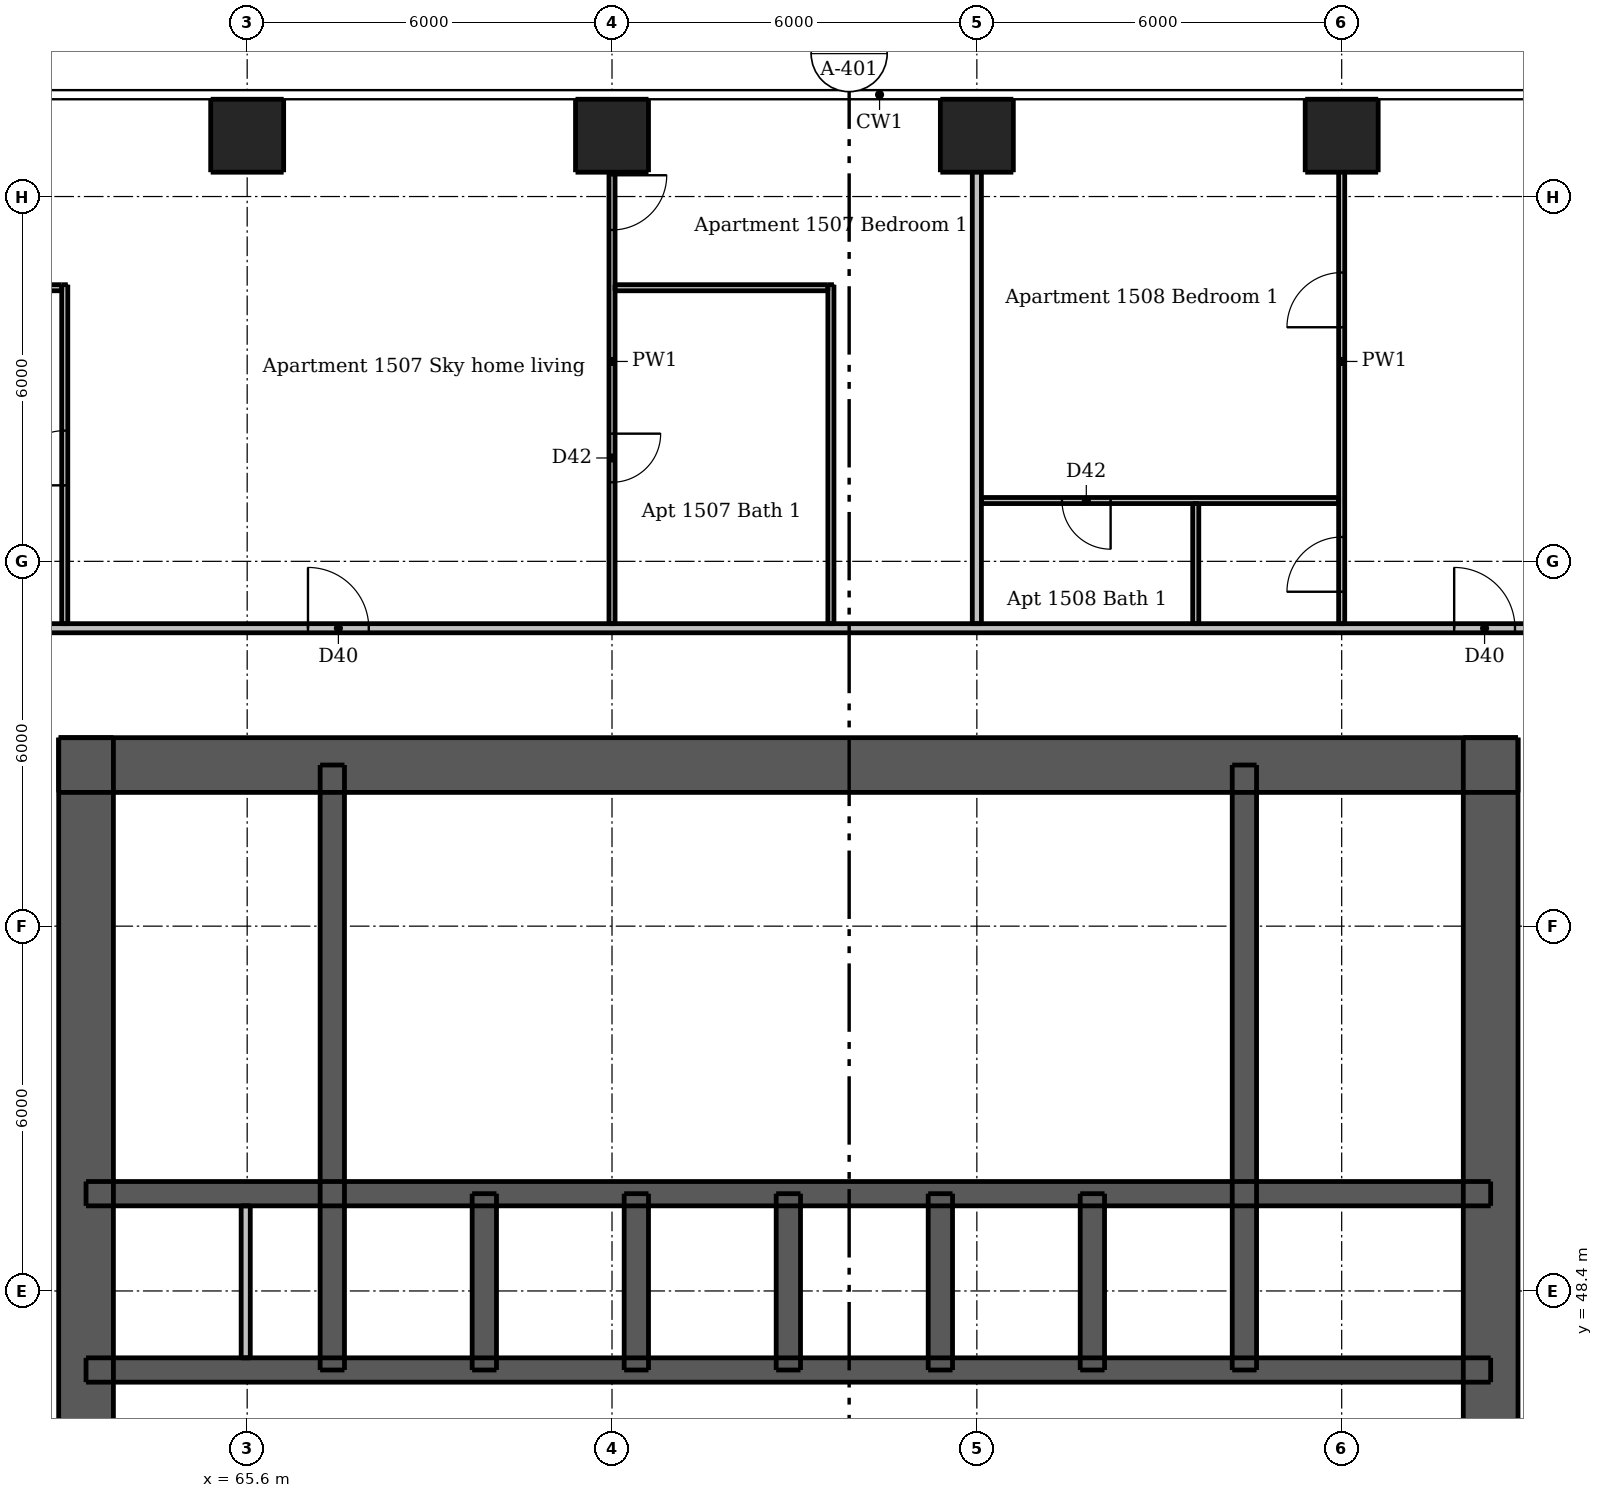
"""IFC4 building model, lengths in metres.
Left out: names, types, materials, properties, quantities, classifications, styles, units other than length and angle.
Written with IfcOpenShell. Run it as: python <this file> out.ifc"""

import sys

from ifc_helpers import new_model, si_unit, direction, frame, frame_2d, origin, origin_2d, place, context, subcontext, project, spatial, rectangle, extrude, element, fill, save


model = new_model("IFC4")
c1 = context("Model", 3, precision=1e-05, world=origin(), true_north=direction((0.0, 1.0)))
c2 = subcontext(c1, "Body", "Model", "MODEL_VIEW")
j1 = project(units=[si_unit("LENGTHUNIT", "METRE"), si_unit("PLANEANGLEUNIT", "RADIAN")], contexts=[c1])
p1 = place(None, origin())
s1 = spatial("IfcSite", under=j1, at=p1, CompositionType="ELEMENT")
p2 = place(p1, origin())
s2 = spatial("IfcBuilding", under=s1, at=p2, CompositionType="ELEMENT")
p3 = place(p2, frame((0.0, 0.0, 56.5)))
s3 = spatial("IfcBuildingStorey", under=s2, at=p3, CompositionType="ELEMENT", Elevation=56.5)
p4 = place(p3, frame((62.5, 57.05, 0.0), z_axis=(0.0, 0.0, 1.0), x_axis=(1.0, 0.0, 0.0)))
e1 = element("IfcWall", 1, at=p4, inside=s3, PredefinedType="SHEAR", context=c2, shape_type="SweptSolid", body=[
    extrude(rectangle(XDim=24.0, YDim=0.9, at=frame_2d((12.0, 0.0))), origin(), (0.0, 0.0, 1.0), 3.05),
])
p5 = place(p4, frame((20.85, 0.0, 0.0)))
e2 = element("IfcOpeningElement", 2, at=p5, cuts=e1, PredefinedType="OPENING", context=c2, shape_type="SweptSolid", body=[
    extrude(rectangle(XDim=1.1, YDim=2.1, at=frame_2d((0.55, 1.05))), frame((0.0, 0.46, 0.0), z_axis=(0.0, -1.0, 0.0), x_axis=(1.0, 0.0, 0.0)), (0.0, 0.0, 1.0), 0.92),
])
p6 = place(p4, frame((2.05, 0.0, 0.0)))
e3 = element("IfcOpeningElement", 3, at=p6, cuts=e1, PredefinedType="OPENING", context=c2, shape_type="SweptSolid", body=[
    extrude(rectangle(XDim=1.1, YDim=2.1, at=frame_2d((0.55, 1.05))), frame((0.0, 0.46, 0.0), z_axis=(0.0, -1.0, 0.0), x_axis=(1.0, 0.0, 0.0)), (0.0, 0.0, 1.0), 0.92),
])
p7 = place(p4, frame((11.55, 0.0, 0.0)))
e4 = element("IfcOpeningElement", 4, at=p7, cuts=e1, PredefinedType="OPENING", context=c2, shape_type="SweptSolid", body=[
    extrude(rectangle(XDim=0.9, YDim=2.1, at=frame_2d((0.45, 1.05))), frame((0.0, 0.46, 0.0), z_axis=(0.0, -1.0, 0.0), x_axis=(1.0, 0.0, 0.0)), (0.0, 0.0, 1.0), 0.92),
])
p8 = place(p3, frame((62.95, 33.5, 0.0), z_axis=(0.0, 0.0, 1.0), x_axis=(0.0, 1.0, 0.0)))
e5 = element("IfcWall", 5, at=p8, inside=s3, PredefinedType="SHEAR", context=c2, shape_type="SweptSolid", body=[
    extrude(rectangle(XDim=24.0, YDim=0.9, at=frame_2d((12.0, 0.0))), origin(), (0.0, 0.0, 1.0), 3.05),
])
p9 = place(p8, frame((11.2, 0.0, 0.0)))
e6 = element("IfcOpeningElement", 6, at=p9, cuts=e5, PredefinedType="OPENING", context=c2, shape_type="SweptSolid", body=[
    extrude(rectangle(XDim=1.6, YDim=2.1, at=frame_2d((0.8, 1.05))), frame((0.0, 0.46, 0.0), z_axis=(0.0, -1.0, 0.0), x_axis=(1.0, 0.0, 0.0)), (0.0, 0.0, 1.0), 0.92),
])
p10 = place(p3, frame((86.05, 33.5, 0.0), z_axis=(0.0, 0.0, 1.0), x_axis=(0.0, 1.0, 0.0)))
e7 = element("IfcWall", 7, at=p10, inside=s3, PredefinedType="SHEAR", context=c2, shape_type="SweptSolid", body=[
    extrude(rectangle(XDim=24.0, YDim=0.9, at=frame_2d((12.0, 0.0))), origin(), (0.0, 0.0, 1.0), 3.05),
])
p11 = place(p10, frame((11.2, 0.0, 0.0)))
e8 = element("IfcOpeningElement", 8, at=p11, cuts=e7, PredefinedType="OPENING", context=c2, shape_type="SweptSolid", body=[
    extrude(rectangle(XDim=1.6, YDim=2.1, at=frame_2d((0.8, 1.05))), frame((0.0, 0.46, 0.0), z_axis=(0.0, -1.0, 0.0), x_axis=(1.0, 0.0, 0.0)), (0.0, 0.0, 1.0), 0.92),
])
p12 = place(p3, frame((62.95, 47.1, 0.0), z_axis=(0.0, 0.0, 1.0), x_axis=(1.0, 0.0, 0.0)))
e9 = element("IfcWall", 9, at=p12, inside=s3, PredefinedType="SHEAR", context=c2, shape_type="SweptSolid", body=[
    extrude(rectangle(XDim=23.1, YDim=0.4, at=frame_2d((11.55, 0.0))), origin(), (0.0, 0.0, 1.0), 3.05),
])
p13 = place(p12, frame((1.088, 0.0, 0.0)))
e10 = element("IfcOpeningElement", 10, at=p13, cuts=e9, PredefinedType="OPENING", context=c2, shape_type="SweptSolid", body=[
    extrude(rectangle(XDim=0.9, YDim=2.1, at=frame_2d((0.45, 1.05))), frame((0.0, 0.21, 0.0), z_axis=(0.0, -1.0, 0.0), x_axis=(1.0, 0.0, 0.0)), (0.0, 0.0, 1.0), 0.42),
])
p14 = place(p12, frame((2.838, 0.0, 0.0)))
e11 = element("IfcOpeningElement", 11, at=p14, cuts=e9, PredefinedType="OPENING", context=c2, shape_type="SweptSolid", body=[
    extrude(rectangle(XDim=0.8, YDim=2.1, at=frame_2d((0.4, 1.05))), frame((0.0, 0.21, 0.0), z_axis=(0.0, -1.0, 0.0), x_axis=(1.0, 0.0, 0.0)), (0.0, 0.0, 1.0), 0.42),
])
p15 = place(p12, frame((20.5, 0.0, 0.0)))
e12 = element("IfcOpeningElement", 12, at=p15, cuts=e9, PredefinedType="OPENING", context=c2, shape_type="SweptSolid", body=[
    extrude(rectangle(XDim=0.9, YDim=2.1, at=frame_2d((0.45, 1.05))), frame((0.0, 0.21, 0.0), z_axis=(0.0, -1.0, 0.0), x_axis=(1.0, 0.0, 0.0)), (0.0, 0.0, 1.0), 0.42),
])
p16 = place(p3, frame((62.95, 50.0, 0.0), z_axis=(0.0, 0.0, 1.0), x_axis=(1.0, 0.0, 0.0)))
e13 = element("IfcWall", 13, at=p16, inside=s3, PredefinedType="SHEAR", context=c2, shape_type="SweptSolid", body=[
    extrude(rectangle(XDim=23.1, YDim=0.4, at=frame_2d((11.55, 0.0))), origin(), (0.0, 0.0, 1.0), 3.05),
])
for number, where, z_axis, x_axis in (
    (14, (67.0, 47.1, 0.0), (0.0, 0.0, 1.0), (0.0, 1.0, 0.0)),
    (15, (82.0, 47.1, 0.0), (0.0, 0.0, 1.0), (0.0, 1.0, 0.0)),
):
    element("IfcWall", number, at=place(p3, frame(where, z_axis=z_axis, x_axis=x_axis)), inside=s3, PredefinedType="SHEAR", context=c2, shape_type="SweptSolid", body=[
        extrude(rectangle(XDim=9.95, YDim=0.4, at=frame_2d((4.975, 0.0))), origin(), (0.0, 0.0, 1.0), 3.05),
    ])
for number, where, z_axis, x_axis in (
    (16, (69.5, 47.1, 0.0), (0.0, 0.0, 1.0), (0.0, 1.0, 0.0)),
    (17, (72.0, 47.1, 0.0), (0.0, 0.0, 1.0), (0.0, 1.0, 0.0)),
    (18, (74.5, 47.1, 0.0), (0.0, 0.0, 1.0), (0.0, 1.0, 0.0)),
    (19, (77.0, 47.1, 0.0), (0.0, 0.0, 1.0), (0.0, 1.0, 0.0)),
    (20, (79.5, 47.1, 0.0), (0.0, 0.0, 1.0), (0.0, 1.0, 0.0)),
):
    element("IfcWall", number, at=place(p3, frame(where, z_axis=z_axis, x_axis=x_axis)), inside=s3, PredefinedType="SHEAR", context=c2, shape_type="SweptSolid", body=[
        extrude(rectangle(XDim=2.9, YDim=0.4, at=frame_2d((1.45, 0.0))), origin(), (0.0, 0.0, 1.0), 3.05),
    ])
for number, where, z_axis, x_axis in (
    (21, (65.6, 67.4, 0.0), (0.0, 0.0, 1.0), (1.0, 0.0, 0.0)),
    (22, (71.6, 67.4, 0.0), (0.0, 0.0, 1.0), (1.0, 0.0, 0.0)),
    (23, (77.6, 67.4, 0.0), (0.0, 0.0, 1.0), (1.0, 0.0, 0.0)),
    (24, (83.6, 67.4, 0.0), (0.0, 0.0, 1.0), (1.0, 0.0, 0.0)),
):
    element("IfcColumn", number, at=place(p3, frame(where, z_axis=z_axis, x_axis=x_axis)), inside=s3, PredefinedType="COLUMN", context=c2, shape_type="SweptSolid", body=[
        extrude(rectangle(XDim=1.2, YDim=1.2, at=origin_2d()), origin(), (0.0, 0.0, 1.0), 3.05),
    ])
p17 = place(p3, frame((65.576, 47.3, 0.0), z_axis=(0.0, 0.0, 1.0), x_axis=(0.0, 1.0, 0.0)))
e25 = element("IfcWall", 25, at=p17, inside=s3, PredefinedType="PLUMBINGWALL", context=c2, shape_type="SweptSolid", body=[
    extrude(rectangle(XDim=2.5, YDim=0.15, at=frame_2d((1.25, 0.0))), origin(), (0.0, 0.0, 1.0), 3.05),
])
p18 = place(p3, frame((62.6, 59.375, 0.0), z_axis=(0.0, 0.0, 1.0), x_axis=(0.0, 1.0, 0.0)))
e26 = element("IfcWall", 26, at=p18, inside=s3, PredefinedType="PARTITIONING", context=c2, shape_type="SweptSolid", body=[
    extrude(rectangle(XDim=5.575, YDim=0.1, at=frame_2d((2.788, 0.0))), origin(), (0.0, 0.0, 1.0), 3.05),
])
p19 = place(p18, frame((2.275, 0.0, 0.0)))
e27 = element("IfcOpeningElement", 27, at=p19, cuts=e26, PredefinedType="OPENING", context=c2, shape_type="SweptSolid", body=[
    extrude(rectangle(XDim=0.9, YDim=2.1, at=frame_2d((0.45, 1.05))), frame((0.0, 0.06, 0.0), z_axis=(0.0, -1.0, 0.0), x_axis=(1.0, 0.0, 0.0)), (0.0, 0.0, 1.0), 0.12),
])
p20 = place(p3, frame((71.6, 68.0, 0.0), z_axis=(0.0, 0.0, 1.0), x_axis=(0.0, -1.0, 0.0)))
e28 = element("IfcWall", 28, at=p20, inside=s3, PredefinedType="PARTITIONING", context=c2, shape_type="SweptSolid", body=[
    extrude(rectangle(XDim=8.625, YDim=0.1, at=frame_2d((4.312, 0.0))), origin(), (0.0, 0.0, 1.0), 2.516),
])
p21 = place(p20, frame((1.25, 0.0, 0.0)))
e29 = element("IfcOpeningElement", 29, at=p21, cuts=e28, PredefinedType="OPENING", context=c2, shape_type="SweptSolid", body=[
    extrude(rectangle(XDim=0.9, YDim=2.1, at=frame_2d((0.45, 1.05))), frame((0.0, 0.06, 0.0), z_axis=(0.0, -1.0, 0.0), x_axis=(1.0, 0.0, 0.0)), (0.0, 0.0, 1.0), 0.12),
])
p22 = place(p20, frame((5.5, 0.0, 0.0)))
e30 = element("IfcOpeningElement", 30, at=p22, cuts=e28, PredefinedType="OPENING", context=c2, shape_type="SweptSolid", body=[
    extrude(rectangle(XDim=0.8, YDim=2.1, at=frame_2d((0.4, 1.05))), frame((0.0, 0.06, 0.0), z_axis=(0.0, -1.0, 0.0), x_axis=(1.0, 0.0, 0.0)), (0.0, 0.0, 1.0), 0.12),
])
p23 = place(p3, frame((75.2, 59.375, 0.0), z_axis=(0.0, 0.0, 1.0), x_axis=(0.0, 1.0, 0.0)))
e31 = element("IfcWall", 31, at=p23, inside=s3, PredefinedType="PARTITIONING", context=c2, shape_type="SweptSolid", body=[
    extrude(rectangle(XDim=5.575, YDim=0.1, at=frame_2d((2.788, 0.0))), origin(), (0.0, 0.0, 1.0), 3.05),
])
p24 = place(p3, frame((81.2, 59.375, 0.0), z_axis=(0.0, 0.0, 1.0), x_axis=(0.0, 1.0, 0.0)))
e32 = element("IfcWall", 32, at=p24, inside=s3, PredefinedType="PARTITIONING", context=c2, shape_type="SweptSolid", body=[
    extrude(rectangle(XDim=1.975, YDim=0.1, at=frame_2d((0.988, 0.0))), origin(), (0.0, 0.0, 1.0), 3.05),
])
p25 = place(p3, frame((83.6, 59.375, 0.0), z_axis=(0.0, 0.0, 1.0), x_axis=(0.0, 1.0, 0.0)))
e33 = element("IfcWall", 33, at=p25, inside=s3, PredefinedType="PARTITIONING", context=c2, shape_type="SweptSolid", body=[
    extrude(rectangle(XDim=8.625, YDim=0.1, at=frame_2d((4.312, 0.0))), origin(), (0.0, 0.0, 1.0), 2.516),
])
p26 = place(p25, frame((0.525, 0.0, 0.0)))
e34 = element("IfcOpeningElement", 34, at=p26, cuts=e33, PredefinedType="OPENING", context=c2, shape_type="SweptSolid", body=[
    extrude(rectangle(XDim=0.9, YDim=2.1, at=frame_2d((0.45, 1.05))), frame((0.0, 0.06, 0.0), z_axis=(0.0, -1.0, 0.0), x_axis=(1.0, 0.0, 0.0)), (0.0, 0.0, 1.0), 0.12),
])
p27 = place(p25, frame((4.875, 0.0, 0.0)))
e35 = element("IfcOpeningElement", 35, at=p27, cuts=e33, PredefinedType="OPENING", context=c2, shape_type="SweptSolid", body=[
    extrude(rectangle(XDim=0.9, YDim=2.1, at=frame_2d((0.45, 1.05))), frame((0.0, 0.06, 0.0), z_axis=(0.0, -1.0, 0.0), x_axis=(1.0, 0.0, 0.0)), (0.0, 0.0, 1.0), 0.12),
])
p28 = place(p3, frame((59.675, 64.9, 0.0), z_axis=(0.0, 0.0, 1.0), x_axis=(1.0, 0.0, 0.0)))
e36 = element("IfcWall", 36, at=p28, inside=s3, PredefinedType="PARTITIONING", context=c2, shape_type="SweptSolid", body=[
    extrude(rectangle(XDim=2.875, YDim=0.1, at=frame_2d((1.438, 0.0))), origin(), (0.0, 0.0, 1.0), 3.05),
])
p29 = place(p3, frame((71.65, 64.9, 0.0), z_axis=(0.0, 0.0, 1.0), x_axis=(1.0, 0.0, 0.0)))
e37 = element("IfcWall", 37, at=p29, inside=s3, PredefinedType="PARTITIONING", context=c2, shape_type="SweptSolid", body=[
    extrude(rectangle(XDim=3.5, YDim=0.1, at=frame_2d((1.75, 0.0))), origin(), (0.0, 0.0, 1.0), 3.05),
])
p30 = place(p3, frame((83.55, 61.4, 0.0), z_axis=(0.0, 0.0, 1.0), x_axis=(-1.0, 0.0, 0.0)))
e38 = element("IfcWall", 38, at=p30, inside=s3, PredefinedType="PARTITIONING", context=c2, shape_type="SweptSolid", body=[
    extrude(rectangle(XDim=5.875, YDim=0.1, at=frame_2d((2.938, 0.0))), origin(), (0.0, 0.0, 1.0), 3.05),
])
p31 = place(p30, frame((3.75, 0.0, 0.0)))
e39 = element("IfcOpeningElement", 39, at=p31, cuts=e38, PredefinedType="OPENING", context=c2, shape_type="SweptSolid", body=[
    extrude(rectangle(XDim=0.8, YDim=2.1, at=frame_2d((0.4, 1.05))), frame((0.0, 0.06, 0.0), z_axis=(0.0, -1.0, 0.0), x_axis=(1.0, 0.0, 0.0)), (0.0, 0.0, 1.0), 0.12),
])
p32 = place(p3, frame((77.6, 59.375, 0.0), z_axis=(0.0, 0.0, 1.0), x_axis=(0.0, 1.0, 0.0)))
e40 = element("IfcWall", 40, at=p32, inside=s3, PredefinedType="PARTITIONING", context=c2, shape_type="SweptSolid", body=[
    extrude(rectangle(XDim=8.625, YDim=0.15, at=frame_2d((4.312, 0.0))), origin(), (0.0, 0.0, 1.0), 2.516),
])
p33 = place(p3, frame((59.675, 59.3, 0.0), z_axis=(0.0, 0.0, 1.0), x_axis=(1.0, 0.0, 0.0)))
e41 = element("IfcWall", 41, at=p33, inside=s3, PredefinedType="PARTITIONING", context=c2, shape_type="SweptSolid", body=[
    extrude(rectangle(XDim=28.55, YDim=0.15, at=frame_2d((14.275, 0.0))), origin(), (0.0, 0.0, 1.0), 3.05),
])
p34 = place(p33, frame((6.925, 0.0, 0.0)))
e42 = element("IfcOpeningElement", 42, at=p34, cuts=e41, PredefinedType="OPENING", context=c2, shape_type="SweptSolid", body=[
    extrude(rectangle(XDim=1.0, YDim=2.1, at=frame_2d((0.5, 1.05))), frame((0.0, 0.085, 0.0), z_axis=(0.0, -1.0, 0.0), x_axis=(1.0, 0.0, 0.0)), (0.0, 0.0, 1.0), 0.17),
])
p35 = place(p33, frame((25.775, 0.0, 0.0)))
e43 = element("IfcOpeningElement", 43, at=p35, cuts=e41, PredefinedType="OPENING", context=c2, shape_type="SweptSolid", body=[
    extrude(rectangle(XDim=1.0, YDim=2.1, at=frame_2d((0.5, 1.05))), frame((0.0, 0.085, 0.0), z_axis=(0.0, -1.0, 0.0), x_axis=(1.0, 0.0, 0.0)), (0.0, 0.0, 1.0), 0.17),
])
p36 = place(p5, origin())
e44 = element("IfcDoor", 44, at=p36, inside=s3, OperationType="SINGLE_SWING_RIGHT", PredefinedType="DOOR", context=c2, shape_type="SweptSolid", body=[
    extrude(rectangle(XDim=1.1, YDim=2.1, at=frame_2d((0.55, 1.05))), frame((0.0, -0.388, 0.0), z_axis=(0.0, -1.0, 0.0), x_axis=(1.0, 0.0, 0.0)), (0.0, 0.0, 1.0), 0.05),
])
fill(e2, e44)
p37 = place(p6, origin())
e45 = element("IfcDoor", 45, at=p37, inside=s3, OperationType="SINGLE_SWING_LEFT", PredefinedType="DOOR", context=c2, shape_type="SweptSolid", body=[
    extrude(rectangle(XDim=1.1, YDim=2.1, at=frame_2d((0.55, 1.05))), frame((0.0, -0.388, 0.0), z_axis=(0.0, -1.0, 0.0), x_axis=(1.0, 0.0, 0.0)), (0.0, 0.0, 1.0), 0.05),
])
fill(e3, e45)
p38 = place(p13, origin())
e46 = element("IfcDoor", 46, at=p38, inside=s3, OperationType="SINGLE_SWING_LEFT", PredefinedType="DOOR", context=c2, shape_type="SweptSolid", body=[
    extrude(rectangle(XDim=0.9, YDim=2.1, at=frame_2d((0.45, 1.05))), frame((0.0, 0.188, 0.0), z_axis=(0.0, -1.0, 0.0), x_axis=(1.0, 0.0, 0.0)), (0.0, 0.0, 1.0), 0.05),
])
fill(e10, e46)
p39 = place(p14, origin())
e47 = element("IfcDoor", 47, at=p39, inside=s3, OperationType="SINGLE_SWING_RIGHT", PredefinedType="DOOR", context=c2, shape_type="SweptSolid", body=[
    extrude(rectangle(XDim=0.8, YDim=2.1, at=frame_2d((0.4, 1.05))), frame((0.0, 0.188, 0.0), z_axis=(0.0, -1.0, 0.0), x_axis=(1.0, 0.0, 0.0)), (0.0, 0.0, 1.0), 0.05),
])
fill(e11, e47)
p40 = place(p15, origin())
e48 = element("IfcDoor", 48, at=p40, inside=s3, OperationType="SINGLE_SWING_LEFT", PredefinedType="DOOR", context=c2, shape_type="SweptSolid", body=[
    extrude(rectangle(XDim=0.9, YDim=2.1, at=frame_2d((0.45, 1.05))), frame((0.0, 0.188, 0.0), z_axis=(0.0, -1.0, 0.0), x_axis=(1.0, 0.0, 0.0)), (0.0, 0.0, 1.0), 0.05),
])
fill(e12, e48)
p41 = place(p7, origin())
e49 = element("IfcDoor", 49, at=p41, inside=s3, OperationType="SINGLE_SWING_RIGHT", PredefinedType="DOOR", context=c2, shape_type="SweptSolid", body=[
    extrude(rectangle(XDim=0.9, YDim=2.1, at=frame_2d((0.45, 1.05))), frame((0.0, -0.388, 0.0), z_axis=(0.0, -1.0, 0.0), x_axis=(1.0, 0.0, 0.0)), (0.0, 0.0, 1.0), 0.05),
])
fill(e4, e49)
p42 = place(p34, origin())
e50 = element("IfcDoor", 50, at=p42, inside=s3, OperationType="SINGLE_SWING_LEFT", PredefinedType="DOOR", context=c2, shape_type="SweptSolid", body=[
    extrude(rectangle(XDim=1.0, YDim=2.1, at=frame_2d((0.5, 1.05))), frame((0.0, 0.025, 0.0), z_axis=(0.0, -1.0, 0.0), x_axis=(1.0, 0.0, 0.0)), (0.0, 0.0, 1.0), 0.05),
])
fill(e42, e50)
p43 = place(p19, origin())
e51 = element("IfcDoor", 51, at=p43, inside=s3, OperationType="SINGLE_SWING_LEFT", PredefinedType="DOOR", context=c2, shape_type="SweptSolid", body=[
    extrude(rectangle(XDim=0.9, YDim=2.1, at=frame_2d((0.45, 1.05))), frame((0.0, 0.025, 0.0), z_axis=(0.0, -1.0, 0.0), x_axis=(1.0, 0.0, 0.0)), (0.0, 0.0, 1.0), 0.05),
])
fill(e27, e51)
p44 = place(p21, origin())
e52 = element("IfcDoor", 52, at=p44, inside=s3, OperationType="SINGLE_SWING_LEFT", PredefinedType="DOOR", context=c2, shape_type="SweptSolid", body=[
    extrude(rectangle(XDim=0.9, YDim=2.1, at=frame_2d((0.45, 1.05))), frame((0.0, 0.025, 0.0), z_axis=(0.0, -1.0, 0.0), x_axis=(1.0, 0.0, 0.0)), (0.0, 0.0, 1.0), 0.05),
])
fill(e29, e52)
p45 = place(p22, origin())
e53 = element("IfcDoor", 53, at=p45, inside=s3, OperationType="SINGLE_SWING_LEFT", PredefinedType="DOOR", context=c2, shape_type="SweptSolid", body=[
    extrude(rectangle(XDim=0.8, YDim=2.1, at=frame_2d((0.4, 1.05))), frame((0.0, 0.025, 0.0), z_axis=(0.0, -1.0, 0.0), x_axis=(1.0, 0.0, 0.0)), (0.0, 0.0, 1.0), 0.05),
])
fill(e30, e53)
p46 = place(p35, origin())
e54 = element("IfcDoor", 54, at=p46, inside=s3, OperationType="SINGLE_SWING_LEFT", PredefinedType="DOOR", context=c2, shape_type="SweptSolid", body=[
    extrude(rectangle(XDim=1.0, YDim=2.1, at=frame_2d((0.5, 1.05))), frame((0.0, 0.025, 0.0), z_axis=(0.0, -1.0, 0.0), x_axis=(1.0, 0.0, 0.0)), (0.0, 0.0, 1.0), 0.05),
])
fill(e43, e54)
p47 = place(p26, origin())
e55 = element("IfcDoor", 55, at=p47, inside=s3, OperationType="SINGLE_SWING_LEFT", PredefinedType="DOOR", context=c2, shape_type="SweptSolid", body=[
    extrude(rectangle(XDim=0.9, YDim=2.1, at=frame_2d((0.45, 1.05))), frame((0.0, 0.025, 0.0), z_axis=(0.0, -1.0, 0.0), x_axis=(1.0, 0.0, 0.0)), (0.0, 0.0, 1.0), 0.05),
])
fill(e34, e55)
p48 = place(p27, origin())
e56 = element("IfcDoor", 56, at=p48, inside=s3, OperationType="SINGLE_SWING_LEFT", PredefinedType="DOOR", context=c2, shape_type="SweptSolid", body=[
    extrude(rectangle(XDim=0.9, YDim=2.1, at=frame_2d((0.45, 1.05))), frame((0.0, 0.025, 0.0), z_axis=(0.0, -1.0, 0.0), x_axis=(1.0, 0.0, 0.0)), (0.0, 0.0, 1.0), 0.05),
])
fill(e35, e56)
p49 = place(p31, origin())
e57 = element("IfcDoor", 57, at=p49, inside=s3, OperationType="SINGLE_SWING_LEFT", PredefinedType="DOOR", context=c2, shape_type="SweptSolid", body=[
    extrude(rectangle(XDim=0.8, YDim=2.1, at=frame_2d((0.4, 1.05))), frame((0.0, 0.025, 0.0), z_axis=(0.0, -1.0, 0.0), x_axis=(1.0, 0.0, 0.0)), (0.0, 0.0, 1.0), 0.05),
])
fill(e39, e57)
save(model, sys.argv[1])
